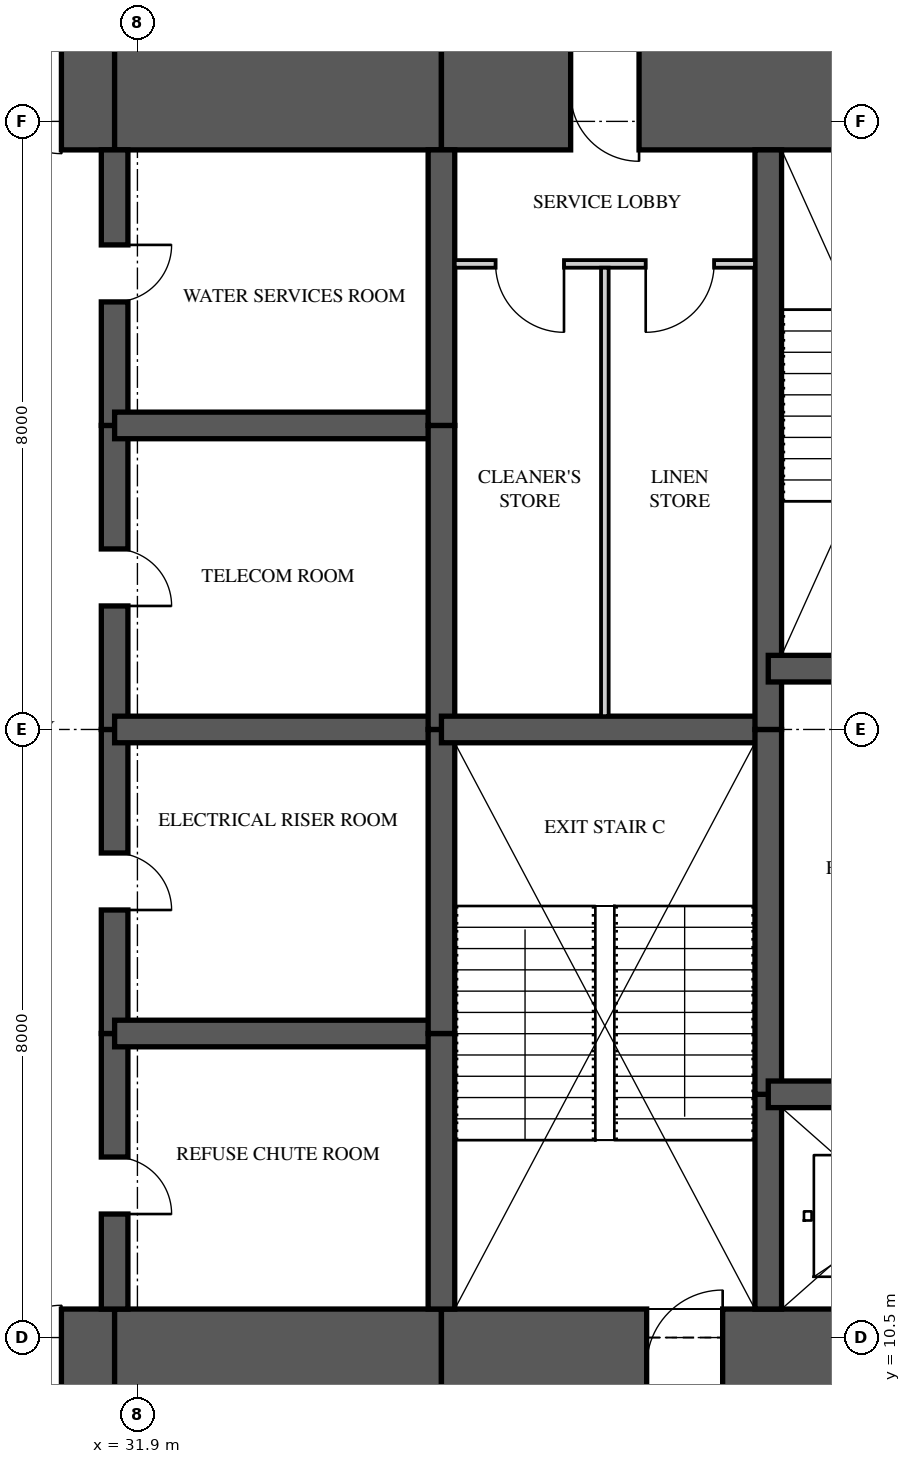
"""IFC4 building model, lengths in metres.
Left out: names, types, materials, properties, quantities, classifications, styles, units other than length and angle.
Written with IfcOpenShell. Run it as: python <this file> out.ifc"""

import sys

from ifc_helpers import new_model, si_unit, direction, frame, frame_2d, origin, place, context, subcontext, project, spatial, rectangle, extrude, element, fill, save


model = new_model("IFC4")
c1 = context("Model", 3, precision=1e-05, world=origin(), true_north=direction((0.0, 1.0)))
c2 = subcontext(c1, "Body", "Model", "MODEL_VIEW")
j1 = project(units=[si_unit("LENGTHUNIT", "METRE"), si_unit("PLANEANGLEUNIT", "RADIAN")], contexts=[c1])
p1 = place(None, origin())
s1 = spatial("IfcSite", under=j1, at=p1, CompositionType="ELEMENT")
p2 = place(p1, origin())
s2 = spatial("IfcBuilding", under=s1, at=p2, CompositionType="ELEMENT")
p3 = place(p2, frame((0.0, 0.0, 135.0)))
s3 = spatial("IfcBuildingStorey", under=s2, at=p3, CompositionType="ELEMENT", Elevation=135.0)
p4 = place(p3, frame((26.0, 10.125, 0.0), z_axis=(0.0, 0.0, 1.0), x_axis=(1.0, 0.0, 0.0)))
e1 = element("IfcWall", 1, at=p4, inside=s3, PredefinedType="SHEAR", context=c2, shape_type="SweptSolid", body=[
    extrude(rectangle(XDim=5.6, YDim=1.5, at=frame_2d((2.8, 0.0))), origin(), (0.0, 0.0, 1.0), 3.35),
])
p5 = place(p4, frame((3.3, 0.0, 0.0)))
e2 = element("IfcOpeningElement", 2, at=p5, cuts=e1, PredefinedType="OPENING", context=c2, shape_type="SweptSolid", body=[
    extrude(rectangle(XDim=1.6, YDim=2.1, at=frame_2d((0.8, 1.05))), frame((0.0, 0.76, 0.0), z_axis=(0.0, -1.0, 0.0), x_axis=(1.0, 0.0, 0.0)), (0.0, 0.0, 1.0), 1.52),
])
p6 = place(p3, frame((31.6, 10.125, 0.0), z_axis=(0.0, 0.0, 1.0), x_axis=(1.0, 0.0, 0.0)))
e3 = element("IfcWall", 3, at=p6, inside=s3, PredefinedType="SHEAR", context=c2, shape_type="SweptSolid", body=[
    extrude(rectangle(XDim=4.3, YDim=1.5, at=frame_2d((2.15, 0.0))), origin(), (0.0, 0.0, 1.0), 3.35),
])
p7 = place(p3, frame((35.9, 10.125, 0.0), z_axis=(0.0, 0.0, 1.0), x_axis=(1.0, 0.0, 0.0)))
e4 = element("IfcWall", 4, at=p7, inside=s3, PredefinedType="SHEAR", context=c2, shape_type="SweptSolid", body=[
    extrude(rectangle(XDim=8.325, YDim=1.5, at=frame_2d((4.163, 0.0))), origin(), (0.0, 0.0, 1.0), 3.35),
])
p8 = place(p7, frame((2.7, 0.0, 0.0)))
e5 = element("IfcOpeningElement", 5, at=p8, cuts=e4, PredefinedType="OPENING", context=c2, shape_type="SweptSolid", body=[
    extrude(rectangle(XDim=1.0, YDim=2.1, at=frame_2d((0.5, 1.05))), frame((0.0, 0.76, 0.0), z_axis=(0.0, -1.0, 0.0), x_axis=(1.0, 0.0, 0.0)), (0.0, 0.0, 1.0), 1.52),
])
p9 = place(p3, frame((44.225, 26.875, 0.0), z_axis=(0.0, 0.0, 1.0), x_axis=(-1.0, 0.0, 0.0)))
e6 = element("IfcWall", 6, at=p9, inside=s3, PredefinedType="SHEAR", context=c2, shape_type="SweptSolid", body=[
    extrude(rectangle(XDim=8.325, YDim=1.5, at=frame_2d((4.163, 0.0))), origin(), (0.0, 0.0, 1.0), 3.35),
])
p10 = place(p9, frame((5.725, 0.0, 0.0)))
e7 = element("IfcOpeningElement", 7, at=p10, cuts=e6, PredefinedType="OPENING", context=c2, shape_type="SweptSolid", body=[
    extrude(rectangle(XDim=0.9, YDim=2.1, at=frame_2d((0.45, 1.05))), frame((0.0, 0.76, 0.0), z_axis=(0.0, -1.0, 0.0), x_axis=(1.0, 0.0, 0.0)), (0.0, 0.0, 1.0), 1.52),
])
p11 = place(p3, frame((35.9, 26.875, 0.0), z_axis=(0.0, 0.0, 1.0), x_axis=(-1.0, 0.0, 0.0)))
e8 = element("IfcWall", 8, at=p11, inside=s3, PredefinedType="SHEAR", context=c2, shape_type="SweptSolid", body=[
    extrude(rectangle(XDim=4.3, YDim=1.5, at=frame_2d((2.15, 0.0))), origin(), (0.0, 0.0, 1.0), 3.35),
])
p12 = place(p3, frame((31.6, 26.875, 0.0), z_axis=(0.0, 0.0, 1.0), x_axis=(-1.0, 0.0, 0.0)))
e9 = element("IfcWall", 9, at=p12, inside=s3, PredefinedType="SHEAR", context=c2, shape_type="SweptSolid", body=[
    extrude(rectangle(XDim=5.6, YDim=1.5, at=frame_2d((2.8, 0.0))), origin(), (0.0, 0.0, 1.0), 3.35),
])
p13 = place(p12, frame((0.7, 0.0, 0.0)))
e10 = element("IfcOpeningElement", 10, at=p13, cuts=e9, PredefinedType="OPENING", context=c2, shape_type="SweptSolid", body=[
    extrude(rectangle(XDim=1.6, YDim=2.1, at=frame_2d((0.8, 1.05))), frame((0.0, 0.76, 0.0), z_axis=(0.0, -1.0, 0.0), x_axis=(1.0, 0.0, 0.0)), (0.0, 0.0, 1.0), 1.52),
])
p14 = place(p3, frame((31.6, 10.875, 0.0), z_axis=(0.0, 0.0, 1.0), x_axis=(0.0, 1.0, 0.0)))
e11 = element("IfcWall", 11, at=p14, inside=s3, PredefinedType="SHEAR", context=c2, shape_type="SweptSolid", body=[
    extrude(rectangle(XDim=3.625, YDim=0.35, at=frame_2d((1.812, 0.0))), origin(), (0.0, 0.0, 1.0), 3.35),
])
p15 = place(p14, frame((1.25, 0.0, 0.0)))
e12 = element("IfcOpeningElement", 12, at=p15, cuts=e11, PredefinedType="OPENING", context=c2, shape_type="SweptSolid", body=[
    extrude(rectangle(XDim=0.75, YDim=2.1, at=frame_2d((0.375, 1.05))), frame((0.0, 0.185, 0.0), z_axis=(0.0, -1.0, 0.0), x_axis=(1.0, 0.0, 0.0)), (0.0, 0.0, 1.0), 0.37),
])
p16 = place(p3, frame((31.6, 14.5, 0.0), z_axis=(0.0, 0.0, 1.0), x_axis=(0.0, 1.0, 0.0)))
e13 = element("IfcWall", 13, at=p16, inside=s3, PredefinedType="SHEAR", context=c2, shape_type="SweptSolid", body=[
    extrude(rectangle(XDim=4.0, YDim=0.35, at=frame_2d((2.0, 0.0))), origin(), (0.0, 0.0, 1.0), 3.35),
])
p17 = place(p16, frame((1.625, 0.0, 0.0)))
e14 = element("IfcOpeningElement", 14, at=p17, cuts=e13, PredefinedType="OPENING", context=c2, shape_type="SweptSolid", body=[
    extrude(rectangle(XDim=0.75, YDim=2.1, at=frame_2d((0.375, 1.05))), frame((0.0, 0.185, 0.0), z_axis=(0.0, -1.0, 0.0), x_axis=(1.0, 0.0, 0.0)), (0.0, 0.0, 1.0), 0.37),
])
p18 = place(p3, frame((31.6, 18.5, 0.0), z_axis=(0.0, 0.0, 1.0), x_axis=(0.0, 1.0, 0.0)))
e15 = element("IfcWall", 15, at=p18, inside=s3, PredefinedType="SHEAR", context=c2, shape_type="SweptSolid", body=[
    extrude(rectangle(XDim=4.0, YDim=0.35, at=frame_2d((2.0, 0.0))), origin(), (0.0, 0.0, 1.0), 3.35),
])
p19 = place(p18, frame((1.625, 0.0, 0.0)))
e16 = element("IfcOpeningElement", 16, at=p19, cuts=e15, PredefinedType="OPENING", context=c2, shape_type="SweptSolid", body=[
    extrude(rectangle(XDim=0.75, YDim=2.1, at=frame_2d((0.375, 1.05))), frame((0.0, 0.185, 0.0), z_axis=(0.0, -1.0, 0.0), x_axis=(1.0, 0.0, 0.0)), (0.0, 0.0, 1.0), 0.37),
])
p20 = place(p3, frame((31.6, 22.5, 0.0), z_axis=(0.0, 0.0, 1.0), x_axis=(0.0, 1.0, 0.0)))
e17 = element("IfcWall", 17, at=p20, inside=s3, PredefinedType="SHEAR", context=c2, shape_type="SweptSolid", body=[
    extrude(rectangle(XDim=3.625, YDim=0.35, at=frame_2d((1.812, 0.0))), origin(), (0.0, 0.0, 1.0), 3.35),
])
p21 = place(p20, frame((1.625, 0.0, 0.0)))
e18 = element("IfcOpeningElement", 18, at=p21, cuts=e17, PredefinedType="OPENING", context=c2, shape_type="SweptSolid", body=[
    extrude(rectangle(XDim=0.75, YDim=2.1, at=frame_2d((0.375, 1.05))), frame((0.0, 0.185, 0.0), z_axis=(0.0, -1.0, 0.0), x_axis=(1.0, 0.0, 0.0)), (0.0, 0.0, 1.0), 0.37),
])
p22 = place(p3, frame((35.9, 10.875, 0.0), z_axis=(0.0, 0.0, 1.0), x_axis=(0.0, 1.0, 0.0)))
e19 = element("IfcWall", 19, at=p22, inside=s3, PredefinedType="SHEAR", context=c2, shape_type="SweptSolid", body=[
    extrude(rectangle(XDim=3.625, YDim=0.35, at=frame_2d((1.812, 0.0))), origin(), (0.0, 0.0, 1.0), 3.35),
])
for number, where, z_axis, x_axis in (
    (20, (35.9, 14.5, 0.0), (0.0, 0.0, 1.0), (0.0, 1.0, 0.0)),
    (21, (35.9, 18.5, 0.0), (0.0, 0.0, 1.0), (0.0, 1.0, 0.0)),
):
    element("IfcWall", number, at=place(p3, frame(where, z_axis=z_axis, x_axis=x_axis)), inside=s3, PredefinedType="SHEAR", context=c2, shape_type="SweptSolid", body=[
        extrude(rectangle(XDim=4.0, YDim=0.35, at=frame_2d((2.0, 0.0))), origin(), (0.0, 0.0, 1.0), 3.35),
    ])
p23 = place(p3, frame((35.9, 22.5, 0.0), z_axis=(0.0, 0.0, 1.0), x_axis=(0.0, 1.0, 0.0)))
e22 = element("IfcWall", 22, at=p23, inside=s3, PredefinedType="SHEAR", context=c2, shape_type="SweptSolid", body=[
    extrude(rectangle(XDim=3.625, YDim=0.35, at=frame_2d((1.812, 0.0))), origin(), (0.0, 0.0, 1.0), 3.35),
])
p24 = place(p3, frame((40.2, 10.875, 0.0), z_axis=(0.0, 0.0, 1.0), x_axis=(0.0, 1.0, 0.0)))
e23 = element("IfcWall", 23, at=p24, inside=s3, PredefinedType="SHEAR", context=c2, shape_type="SweptSolid", body=[
    extrude(rectangle(XDim=2.825, YDim=0.35, at=frame_2d((1.413, 0.0))), origin(), (0.0, 0.0, 1.0), 3.35),
])
p25 = place(p3, frame((40.2, 13.7, 0.0), z_axis=(0.0, 0.0, 1.0), x_axis=(0.0, 1.0, 0.0)))
e24 = element("IfcWall", 24, at=p25, inside=s3, PredefinedType="SHEAR", context=c2, shape_type="SweptSolid", body=[
    extrude(rectangle(XDim=4.8, YDim=0.35, at=frame_2d((2.4, 0.0))), origin(), (0.0, 0.0, 1.0), 3.35),
])
p26 = place(p3, frame((40.2, 18.5, 0.0), z_axis=(0.0, 0.0, 1.0), x_axis=(0.0, 1.0, 0.0)))
e25 = element("IfcWall", 25, at=p26, inside=s3, PredefinedType="SHEAR", context=c2, shape_type="SweptSolid", body=[
    extrude(rectangle(XDim=7.625, YDim=0.35, at=frame_2d((3.812, 0.0))), origin(), (0.0, 0.0, 1.0), 3.35),
])
for number, where, z_axis, x_axis in (
    (26, (31.6, 14.5, 0.0), (0.0, 0.0, 1.0), (1.0, 0.0, 0.0)),
    (27, (31.6, 18.5, 0.0), (0.0, 0.0, 1.0), (1.0, 0.0, 0.0)),
    (28, (31.6, 22.5, 0.0), (0.0, 0.0, 1.0), (1.0, 0.0, 0.0)),
):
    element("IfcWall", number, at=place(p3, frame(where, z_axis=z_axis, x_axis=x_axis)), inside=s3, PredefinedType="SHEAR", context=c2, shape_type="SweptSolid", body=[
        extrude(rectangle(XDim=4.3, YDim=0.35, at=frame_2d((2.15, 0.0))), origin(), (0.0, 0.0, 1.0), 3.35),
    ])
p27 = place(p3, frame((35.9, 18.5, 0.0), z_axis=(0.0, 0.0, 1.0), x_axis=(1.0, 0.0, 0.0)))
e29 = element("IfcWall", 29, at=p27, inside=s3, PredefinedType="SHEAR", context=c2, shape_type="SweptSolid", body=[
    extrude(rectangle(XDim=4.3, YDim=0.35, at=frame_2d((2.15, 0.0))), origin(), (0.0, 0.0, 1.0), 3.35),
])
p28 = place(p3, frame((40.2, 13.7, 0.0), z_axis=(0.0, 0.0, 1.0), x_axis=(1.0, 0.0, 0.0)))
e30 = element("IfcWall", 30, at=p28, inside=s3, PredefinedType="SHEAR", context=c2, shape_type="SweptSolid", body=[
    extrude(rectangle(XDim=3.6, YDim=0.35, at=frame_2d((1.8, 0.0))), origin(), (0.0, 0.0, 1.0), 3.35),
])
p29 = place(p28, frame((1.2, 0.0, 0.0)))
e31 = element("IfcOpeningElement", 31, at=p29, cuts=e30, PredefinedType="OPENING", context=c2, shape_type="SweptSolid", body=[
    extrude(rectangle(XDim=1.2, YDim=2.1, at=frame_2d((0.6, 1.05))), frame((0.0, 0.185, 0.0), z_axis=(0.0, -1.0, 0.0), x_axis=(1.0, 0.0, 0.0)), (0.0, 0.0, 1.0), 0.37),
])
p30 = place(p3, frame((40.2, 19.3, 0.0), z_axis=(0.0, 0.0, 1.0), x_axis=(1.0, 0.0, 0.0)))
e32 = element("IfcWall", 32, at=p30, inside=s3, PredefinedType="SHEAR", context=c2, shape_type="SweptSolid", body=[
    extrude(rectangle(XDim=3.6, YDim=0.35, at=frame_2d((1.8, 0.0))), origin(), (0.0, 0.0, 1.0), 3.35),
])
p31 = place(p30, frame((1.3, 0.0, 0.0)))
e33 = element("IfcOpeningElement", 33, at=p31, cuts=e32, PredefinedType="OPENING", context=c2, shape_type="SweptSolid", body=[
    extrude(rectangle(XDim=1.0, YDim=2.1, at=frame_2d((0.5, 1.05))), frame((0.0, 0.185, 0.0), z_axis=(0.0, -1.0, 0.0), x_axis=(1.0, 0.0, 0.0)), (0.0, 0.0, 1.0), 0.37),
])
p32 = place(p3, frame((36.075, 24.625, 0.0), z_axis=(0.0, 0.0, 1.0), x_axis=(1.0, 0.0, 0.0)))
e34 = element("IfcWall", 34, at=p32, inside=s3, PredefinedType="PARTITIONING", context=c2, shape_type="SweptSolid", body=[
    extrude(rectangle(XDim=3.95, YDim=0.1, at=frame_2d((1.975, 0.0))), origin(), (0.0, 0.0, 1.0), 3.11),
])
p33 = place(p32, frame((0.538, 0.0, 0.0)))
e35 = element("IfcOpeningElement", 35, at=p33, cuts=e34, PredefinedType="OPENING", context=c2, shape_type="SweptSolid", body=[
    extrude(rectangle(XDim=0.9, YDim=2.1, at=frame_2d((0.45, 1.05))), frame((0.0, 0.06, 0.0), z_axis=(0.0, -1.0, 0.0), x_axis=(1.0, 0.0, 0.0)), (0.0, 0.0, 1.0), 0.12),
])
p34 = place(p32, frame((2.512, 0.0, 0.0)))
e36 = element("IfcOpeningElement", 36, at=p34, cuts=e34, PredefinedType="OPENING", context=c2, shape_type="SweptSolid", body=[
    extrude(rectangle(XDim=0.9, YDim=2.1, at=frame_2d((0.45, 1.05))), frame((0.0, 0.06, 0.0), z_axis=(0.0, -1.0, 0.0), x_axis=(1.0, 0.0, 0.0)), (0.0, 0.0, 1.0), 0.12),
])
p35 = place(p3, frame((38.05, 18.675, 0.0), z_axis=(0.0, 0.0, 1.0), x_axis=(0.0, 1.0, 0.0)))
e37 = element("IfcWall", 37, at=p35, inside=s3, PredefinedType="PARTITIONING", context=c2, shape_type="SweptSolid", body=[
    extrude(rectangle(XDim=5.9, YDim=0.1, at=frame_2d((2.95, 0.0))), origin(), (0.0, 0.0, 1.0), 3.11),
])
p36 = place(p33, frame((0.9, 0.0, 0.0), z_axis=(0.0, 0.0, 1.0), x_axis=(-1.0, 0.0, 0.0)))
e38 = element("IfcDoor", 38, at=p36, inside=s3, OperationType="SINGLE_SWING_LEFT", PredefinedType="DOOR", context=c2, shape_type="SweptSolid", body=[
    extrude(rectangle(XDim=0.9, YDim=2.1, at=frame_2d((0.45, 1.05))), frame((0.0, 0.025, 0.0), z_axis=(0.0, -1.0, 0.0), x_axis=(1.0, 0.0, 0.0)), (0.0, 0.0, 1.0), 0.05),
])
fill(e35, e38)
p37 = place(p34, frame((0.9, 0.0, 0.0), z_axis=(0.0, 0.0, 1.0), x_axis=(-1.0, 0.0, 0.0)))
e39 = element("IfcDoor", 39, at=p37, inside=s3, OperationType="SINGLE_SWING_RIGHT", PredefinedType="DOOR", context=c2, shape_type="SweptSolid", body=[
    extrude(rectangle(XDim=0.9, YDim=2.1, at=frame_2d((0.45, 1.05))), frame((0.0, 0.025, 0.0), z_axis=(0.0, -1.0, 0.0), x_axis=(1.0, 0.0, 0.0)), (0.0, 0.0, 1.0), 0.05),
])
fill(e36, e39)
p38 = place(p5, origin())
e40 = element("IfcDoor", 40, at=p38, inside=s3, OperationType="DOUBLE_DOOR_SINGLE_SWING", PredefinedType="DOOR", context=c2, shape_type="SweptSolid", body=[
    extrude(rectangle(XDim=1.6, YDim=2.1, at=frame_2d((0.8, 1.05))), frame((0.0, 0.025, 0.0), z_axis=(0.0, -1.0, 0.0), x_axis=(1.0, 0.0, 0.0)), (0.0, 0.0, 1.0), 0.05),
])
fill(e2, e40)
p39 = place(p13, origin())
e41 = element("IfcDoor", 41, at=p39, inside=s3, OperationType="DOUBLE_DOOR_SINGLE_SWING", PredefinedType="DOOR", context=c2, shape_type="SweptSolid", body=[
    extrude(rectangle(XDim=1.6, YDim=2.1, at=frame_2d((0.8, 1.05))), frame((0.0, 0.025, 0.0), z_axis=(0.0, -1.0, 0.0), x_axis=(1.0, 0.0, 0.0)), (0.0, 0.0, 1.0), 0.05),
])
fill(e10, e41)
p40 = place(p15, frame((0.75, 0.0, 0.0), z_axis=(0.0, 0.0, 1.0), x_axis=(-1.0, 0.0, 0.0)))
e42 = element("IfcDoor", 42, at=p40, inside=s3, OperationType="SINGLE_SWING_RIGHT", PredefinedType="DOOR", context=c2, shape_type="SweptSolid", body=[
    extrude(rectangle(XDim=0.75, YDim=2.1, at=frame_2d((0.375, 1.05))), frame((0.0, 0.025, 0.0), z_axis=(0.0, -1.0, 0.0), x_axis=(1.0, 0.0, 0.0)), (0.0, 0.0, 1.0), 0.05),
])
fill(e12, e42)
p41 = place(p17, frame((0.75, 0.0, 0.0), z_axis=(0.0, 0.0, 1.0), x_axis=(-1.0, 0.0, 0.0)))
e43 = element("IfcDoor", 43, at=p41, inside=s3, OperationType="SINGLE_SWING_RIGHT", PredefinedType="DOOR", context=c2, shape_type="SweptSolid", body=[
    extrude(rectangle(XDim=0.75, YDim=2.1, at=frame_2d((0.375, 1.05))), frame((0.0, 0.025, 0.0), z_axis=(0.0, -1.0, 0.0), x_axis=(1.0, 0.0, 0.0)), (0.0, 0.0, 1.0), 0.05),
])
fill(e14, e43)
p42 = place(p19, frame((0.75, 0.0, 0.0), z_axis=(0.0, 0.0, 1.0), x_axis=(-1.0, 0.0, 0.0)))
e44 = element("IfcDoor", 44, at=p42, inside=s3, OperationType="SINGLE_SWING_RIGHT", PredefinedType="DOOR", context=c2, shape_type="SweptSolid", body=[
    extrude(rectangle(XDim=0.75, YDim=2.1, at=frame_2d((0.375, 1.05))), frame((0.0, 0.025, 0.0), z_axis=(0.0, -1.0, 0.0), x_axis=(1.0, 0.0, 0.0)), (0.0, 0.0, 1.0), 0.05),
])
fill(e16, e44)
p43 = place(p21, frame((0.75, 0.0, 0.0), z_axis=(0.0, 0.0, 1.0), x_axis=(-1.0, 0.0, 0.0)))
e45 = element("IfcDoor", 45, at=p43, inside=s3, OperationType="SINGLE_SWING_LEFT", PredefinedType="DOOR", context=c2, shape_type="SweptSolid", body=[
    extrude(rectangle(XDim=0.75, YDim=2.1, at=frame_2d((0.375, 1.05))), frame((0.0, 0.025, 0.0), z_axis=(0.0, -1.0, 0.0), x_axis=(1.0, 0.0, 0.0)), (0.0, 0.0, 1.0), 0.05),
])
fill(e18, e45)
p44 = place(p8, origin())
e46 = element("IfcDoor", 46, at=p44, inside=s3, OperationType="SINGLE_SWING_RIGHT", PredefinedType="DOOR", context=c2, shape_type="SweptSolid", body=[
    extrude(rectangle(XDim=1.0, YDim=2.1, at=frame_2d((0.5, 1.05))), frame((0.0, 0.025, 0.0), z_axis=(0.0, -1.0, 0.0), x_axis=(1.0, 0.0, 0.0)), (0.0, 0.0, 1.0), 0.05),
])
fill(e5, e46)
p45 = place(p10, origin())
e47 = element("IfcDoor", 47, at=p45, inside=s3, OperationType="SINGLE_SWING_LEFT", PredefinedType="DOOR", context=c2, shape_type="SweptSolid", body=[
    extrude(rectangle(XDim=0.9, YDim=2.1, at=frame_2d((0.45, 1.05))), frame((0.0, 0.47, 0.0), z_axis=(0.0, -1.0, 0.0), x_axis=(1.0, 0.0, 0.0)), (0.0, 0.0, 1.0), 0.8),
])
fill(e7, e47)
save(model, sys.argv[1])
